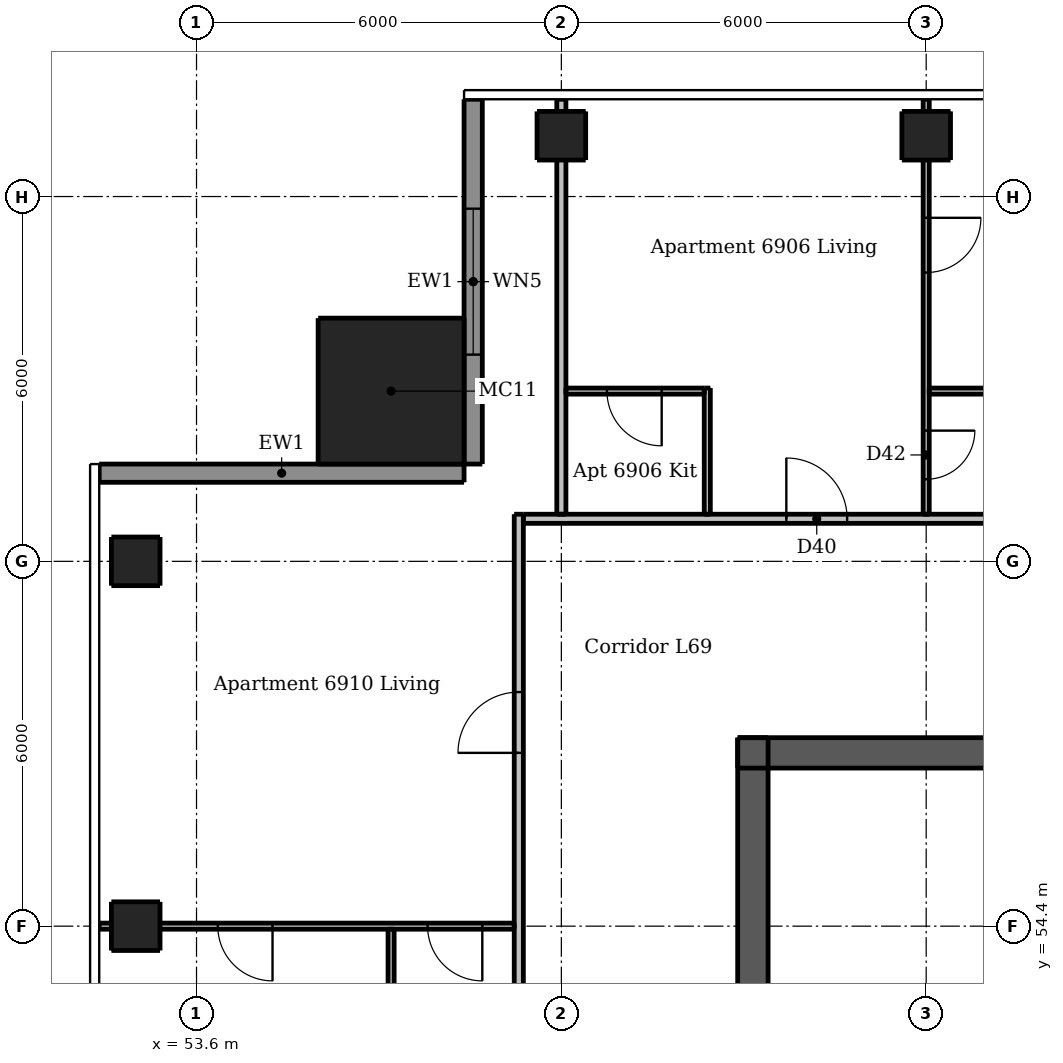
"""IFC4 building model, lengths in metres.
Left out: names, types, materials, properties, quantities, classifications, styles, units other than length and angle.
Written with IfcOpenShell. Run it as: python <this file> out.ifc"""

import sys

from ifc_helpers import new_model, si_unit, direction, frame, frame_2d, origin, origin_2d, place, context, subcontext, project, spatial, rectangle, extrude, element, fill, save


model = new_model("IFC4")
c1 = context("Model", 3, precision=1e-05, world=origin(), true_north=direction((0.0, 1.0)))
c2 = subcontext(c1, "Body", "Model", "MODEL_VIEW")
j1 = project(units=[si_unit("LENGTHUNIT", "METRE"), si_unit("PLANEANGLEUNIT", "RADIAN")], contexts=[c1])
p1 = place(None, origin())
s1 = spatial("IfcSite", under=j1, at=p1, CompositionType="ELEMENT")
p2 = place(p1, origin())
s2 = spatial("IfcBuilding", under=s1, at=p2, CompositionType="ELEMENT")
p3 = place(p2, frame((0.0, 0.0, 258.7)))
s3 = spatial("IfcBuildingStorey", under=s2, at=p3, CompositionType="ELEMENT", Elevation=258.7)
p4 = place(p3, frame((62.5, 57.25, 0.0), z_axis=(0.0, 0.0, 1.0), x_axis=(1.0, 0.0, 0.0)))
e1 = element("IfcWall", 1, at=p4, inside=s3, PredefinedType="SHEAR", context=c2, shape_type="SweptSolid", body=[
    extrude(rectangle(XDim=24.0, YDim=0.5, at=frame_2d((12.0, 0.0))), origin(), (0.0, 0.0, 1.0), 3.05),
])
p5 = place(p4, frame((21.025, 0.0, 0.0)))
e2 = element("IfcOpeningElement", 2, at=p5, cuts=e1, PredefinedType="OPENING", context=c2, shape_type="SweptSolid", body=[
    extrude(rectangle(XDim=1.1, YDim=2.1, at=frame_2d((0.55, 1.05))), frame((0.0, 0.26, 0.0), z_axis=(0.0, -1.0, 0.0), x_axis=(1.0, 0.0, 0.0)), (0.0, 0.0, 1.0), 0.52),
])
p6 = place(p4, frame((1.875, 0.0, 0.0)))
e3 = element("IfcOpeningElement", 3, at=p6, cuts=e1, PredefinedType="OPENING", context=c2, shape_type="SweptSolid", body=[
    extrude(rectangle(XDim=1.1, YDim=2.1, at=frame_2d((0.55, 1.05))), frame((0.0, 0.26, 0.0), z_axis=(0.0, -1.0, 0.0), x_axis=(1.0, 0.0, 0.0)), (0.0, 0.0, 1.0), 0.52),
])
p7 = place(p4, frame((11.55, 0.0, 0.0)))
e4 = element("IfcOpeningElement", 4, at=p7, cuts=e1, PredefinedType="OPENING", context=c2, shape_type="SweptSolid", body=[
    extrude(rectangle(XDim=0.9, YDim=2.1, at=frame_2d((0.45, 1.05))), frame((0.0, 0.26, 0.0), z_axis=(0.0, -1.0, 0.0), x_axis=(1.0, 0.0, 0.0)), (0.0, 0.0, 1.0), 0.52),
])
p8 = place(p3, frame((62.75, 33.5, 0.0), z_axis=(0.0, 0.0, 1.0), x_axis=(0.0, 1.0, 0.0)))
e5 = element("IfcWall", 5, at=p8, inside=s3, PredefinedType="SHEAR", context=c2, shape_type="SweptSolid", body=[
    extrude(rectangle(XDim=24.0, YDim=0.5, at=frame_2d((12.0, 0.0))), origin(), (0.0, 0.0, 1.0), 3.05),
])
p9 = place(p8, frame((11.2, 0.0, 0.0)))
e6 = element("IfcOpeningElement", 6, at=p9, cuts=e5, PredefinedType="OPENING", context=c2, shape_type="SweptSolid", body=[
    extrude(rectangle(XDim=1.6, YDim=2.1, at=frame_2d((0.8, 1.05))), frame((0.0, 0.26, 0.0), z_axis=(0.0, -1.0, 0.0), x_axis=(1.0, 0.0, 0.0)), (0.0, 0.0, 1.0), 0.52),
])
for number, where, z_axis, x_axis in (
    (7, (59.6, 67.4, 0.0), (0.0, 0.0, 1.0), (1.0, 0.0, 0.0)),
    (8, (65.6, 67.4, 0.0), (0.0, 0.0, 1.0), (1.0, 0.0, 0.0)),
    (9, (52.6, 54.4, 0.0), (0.0, 0.0, 1.0), (1.0, 0.0, 0.0)),
    (10, (52.6, 60.4, 0.0), (0.0, 0.0, 1.0), (1.0, 0.0, 0.0)),
):
    element("IfcColumn", number, at=place(p3, frame(where, z_axis=z_axis, x_axis=x_axis)), inside=s3, PredefinedType="COLUMN", context=c2, shape_type="SweptSolid", body=[
        extrude(rectangle(XDim=0.8, YDim=0.8, at=origin_2d()), origin(), (0.0, 0.0, 1.0), 3.05),
    ])
p10 = place(p3, frame((56.8, 63.2, 0.0), z_axis=(0.0, 0.0, 1.0), x_axis=(1.0, 0.0, 0.0)))
e11 = element("IfcColumn", 11, at=p10, inside=s3, PredefinedType="COLUMN", context=c2, shape_type="SweptSolid", body=[
    extrude(rectangle(XDim=2.4, YDim=2.4, at=origin_2d()), origin(), (0.0, 0.0, 1.0), 3.3),
])
p11 = place(p3, frame((58.15, 68.0, 0.0), z_axis=(0.0, 0.0, 1.0), x_axis=(0.0, -1.0, 0.0)))
e12 = element("IfcWall", 12, at=p11, inside=s3, PredefinedType="SOLIDWALL", context=c2, shape_type="SweptSolid", body=[
    extrude(rectangle(XDim=6.0, YDim=0.3, at=frame_2d((3.0, 0.0))), origin(), (0.0, 0.0, 1.0), 3.05),
])
p12 = place(p11, frame((1.8, 0.0, 0.15)))
e13 = element("IfcOpeningElement", 13, at=p12, cuts=e12, PredefinedType="OPENING", context=c2, shape_type="SweptSolid", body=[
    extrude(rectangle(XDim=2.4, YDim=2.1, at=frame_2d((1.2, 1.05))), frame((0.0, 0.16, 0.0), z_axis=(0.0, -1.0, 0.0), x_axis=(1.0, 0.0, 0.0)), (0.0, 0.0, 1.0), 0.32),
])
p13 = place(p3, frame((58.0, 61.85, 0.0), z_axis=(0.0, 0.0, 1.0), x_axis=(-1.0, 0.0, 0.0)))
e14 = element("IfcWall", 14, at=p13, inside=s3, PredefinedType="SOLIDWALL", context=c2, shape_type="SweptSolid", body=[
    extrude(rectangle(XDim=6.0, YDim=0.3, at=frame_2d((3.0, 0.0))), origin(), (0.0, 0.0, 1.0), 3.05),
])
p14 = place(p3, frame((56.8, 54.35, 0.0), z_axis=(0.0, 0.0, 1.0), x_axis=(0.0, -1.0, 0.0)))
e15 = element("IfcWall", 15, at=p14, inside=s3, PredefinedType="PARTITIONING", context=c2, shape_type="SweptSolid", body=[
    extrude(rectangle(XDim=5.875, YDim=0.1, at=frame_2d((2.938, 0.0))), origin(), (0.0, 0.0, 1.0), 3.05),
])
p15 = place(p14, frame((3.75, 0.0, 0.0)))
e16 = element("IfcOpeningElement", 16, at=p15, cuts=e15, PredefinedType="OPENING", context=c2, shape_type="SweptSolid", body=[
    extrude(rectangle(XDim=0.8, YDim=2.1, at=frame_2d((0.4, 1.05))), frame((0.0, 0.06, 0.0), z_axis=(0.0, -1.0, 0.0), x_axis=(1.0, 0.0, 0.0)), (0.0, 0.0, 1.0), 0.12),
])
p16 = place(p3, frame((62.0, 61.175, 0.0), z_axis=(0.0, 0.0, 1.0), x_axis=(0.0, 1.0, 0.0)))
e17 = element("IfcWall", 17, at=p16, inside=s3, PredefinedType="PARTITIONING", context=c2, shape_type="SweptSolid", body=[
    extrude(rectangle(XDim=2.075, YDim=0.1, at=frame_2d((1.038, 0.0))), origin(), (0.0, 0.0, 1.0), 3.05),
])
p17 = place(p3, frame((65.6, 68.0, 0.0), z_axis=(0.0, 0.0, 1.0), x_axis=(0.0, -1.0, 0.0)))
e18 = element("IfcWall", 18, at=p17, inside=s3, PredefinedType="PARTITIONING", context=c2, shape_type="SweptSolid", body=[
    extrude(rectangle(XDim=6.825, YDim=0.1, at=frame_2d((3.413, 0.0))), origin(), (0.0, 0.0, 1.0), 2.516),
])
p18 = place(p17, frame((1.95, 0.0, 0.0)))
e19 = element("IfcOpeningElement", 19, at=p18, cuts=e18, PredefinedType="OPENING", context=c2, shape_type="SweptSolid", body=[
    extrude(rectangle(XDim=0.9, YDim=2.1, at=frame_2d((0.45, 1.05))), frame((0.0, 0.06, 0.0), z_axis=(0.0, -1.0, 0.0), x_axis=(1.0, 0.0, 0.0)), (0.0, 0.0, 1.0), 0.12),
])
p19 = place(p17, frame((5.45, 0.0, 0.0)))
e20 = element("IfcOpeningElement", 20, at=p19, cuts=e18, PredefinedType="OPENING", context=c2, shape_type="SweptSolid", body=[
    extrude(rectangle(XDim=0.8, YDim=2.1, at=frame_2d((0.4, 1.05))), frame((0.0, 0.06, 0.0), z_axis=(0.0, -1.0, 0.0), x_axis=(1.0, 0.0, 0.0)), (0.0, 0.0, 1.0), 0.12),
])
p20 = place(p3, frame((61.95, 63.2, 0.0), z_axis=(0.0, 0.0, 1.0), x_axis=(-1.0, 0.0, 0.0)))
e21 = element("IfcWall", 21, at=p20, inside=s3, PredefinedType="PARTITIONING", context=c2, shape_type="SweptSolid", body=[
    extrude(rectangle(XDim=2.275, YDim=0.1, at=frame_2d((1.137, 0.0))), origin(), (0.0, 0.0, 1.0), 3.05),
])
p21 = place(p20, frame((0.7, 0.0, 0.0)))
e22 = element("IfcOpeningElement", 22, at=p21, cuts=e21, PredefinedType="OPENING", context=c2, shape_type="SweptSolid", body=[
    extrude(rectangle(XDim=0.9, YDim=2.1, at=frame_2d((0.45, 1.05))), frame((0.0, 0.06, 0.0), z_axis=(0.0, -1.0, 0.0), x_axis=(1.0, 0.0, 0.0)), (0.0, 0.0, 1.0), 0.12),
])
p22 = place(p3, frame((65.65, 63.2, 0.0), z_axis=(0.0, 0.0, 1.0), x_axis=(1.0, 0.0, 0.0)))
e23 = element("IfcWall", 23, at=p22, inside=s3, PredefinedType="PARTITIONING", context=c2, shape_type="SweptSolid", body=[
    extrude(rectangle(XDim=3.5, YDim=0.1, at=frame_2d((1.75, 0.0))), origin(), (0.0, 0.0, 1.0), 3.05),
])
p23 = place(p3, frame((58.825, 54.4, 0.0), z_axis=(0.0, 0.0, 1.0), x_axis=(-1.0, 0.0, 0.0)))
e24 = element("IfcWall", 24, at=p23, inside=s3, PredefinedType="PARTITIONING", context=c2, shape_type="SweptSolid", body=[
    extrude(rectangle(XDim=6.825, YDim=0.1, at=frame_2d((3.413, 0.0))), origin(), (0.0, 0.0, 1.0), 2.516),
])
p24 = place(p23, frame((0.525, 0.0, 0.0)))
e25 = element("IfcOpeningElement", 25, at=p24, cuts=e24, PredefinedType="OPENING", context=c2, shape_type="SweptSolid", body=[
    extrude(rectangle(XDim=0.9, YDim=2.1, at=frame_2d((0.45, 1.05))), frame((0.0, 0.06, 0.0), z_axis=(0.0, -1.0, 0.0), x_axis=(1.0, 0.0, 0.0)), (0.0, 0.0, 1.0), 0.12),
])
p25 = place(p23, frame((3.975, 0.0, 0.0)))
e26 = element("IfcOpeningElement", 26, at=p25, cuts=e24, PredefinedType="OPENING", context=c2, shape_type="SweptSolid", body=[
    extrude(rectangle(XDim=0.9, YDim=2.1, at=frame_2d((0.45, 1.05))), frame((0.0, 0.06, 0.0), z_axis=(0.0, -1.0, 0.0), x_axis=(1.0, 0.0, 0.0)), (0.0, 0.0, 1.0), 0.12),
])
p26 = place(p3, frame((58.9, 30.325, 0.0), z_axis=(0.0, 0.0, 1.0), x_axis=(0.0, 1.0, 0.0)))
e27 = element("IfcWall", 27, at=p26, inside=s3, PredefinedType="PARTITIONING", context=c2, shape_type="SweptSolid", body=[
    extrude(rectangle(XDim=30.85, YDim=0.15, at=frame_2d((15.425, 0.0))), origin(), (0.0, 0.0, 1.0), 3.05),
])
p27 = place(p26, frame((9.225, 0.0, 0.0)))
e28 = element("IfcOpeningElement", 28, at=p27, cuts=e27, PredefinedType="OPENING", context=c2, shape_type="SweptSolid", body=[
    extrude(rectangle(XDim=1.0, YDim=2.1, at=frame_2d((0.5, 1.05))), frame((0.0, 0.085, 0.0), z_axis=(0.0, -1.0, 0.0), x_axis=(1.0, 0.0, 0.0)), (0.0, 0.0, 1.0), 0.17),
])
p28 = place(p26, frame((26.925, 0.0, 0.0)))
e29 = element("IfcOpeningElement", 29, at=p28, cuts=e27, PredefinedType="OPENING", context=c2, shape_type="SweptSolid", body=[
    extrude(rectangle(XDim=1.0, YDim=2.1, at=frame_2d((0.5, 1.05))), frame((0.0, 0.085, 0.0), z_axis=(0.0, -1.0, 0.0), x_axis=(1.0, 0.0, 0.0)), (0.0, 0.0, 1.0), 0.17),
])
p29 = place(p3, frame((59.6, 61.175, 0.0), z_axis=(0.0, 0.0, 1.0), x_axis=(0.0, 1.0, 0.0)))
e30 = element("IfcWall", 30, at=p29, inside=s3, PredefinedType="PARTITIONING", context=c2, shape_type="SweptSolid", body=[
    extrude(rectangle(XDim=6.825, YDim=0.15, at=frame_2d((3.413, 0.0))), origin(), (0.0, 0.0, 1.0), 2.51),
])
p30 = place(p3, frame((58.975, 61.1, 0.0), z_axis=(0.0, 0.0, 1.0), x_axis=(1.0, 0.0, 0.0)))
e31 = element("IfcWall", 31, at=p30, inside=s3, PredefinedType="PARTITIONING", context=c2, shape_type="SweptSolid", body=[
    extrude(rectangle(XDim=29.25, YDim=0.15, at=frame_2d((14.625, 0.0))), origin(), (0.0, 0.0, 1.0), 3.05),
])
p31 = place(p30, frame((4.325, 0.0, 0.0)))
e32 = element("IfcOpeningElement", 32, at=p31, cuts=e31, PredefinedType="OPENING", context=c2, shape_type="SweptSolid", body=[
    extrude(rectangle(XDim=1.0, YDim=2.1, at=frame_2d((0.5, 1.05))), frame((0.0, 0.085, 0.0), z_axis=(0.0, -1.0, 0.0), x_axis=(1.0, 0.0, 0.0)), (0.0, 0.0, 1.0), 0.17),
])
p32 = place(p30, frame((15.125, 0.0, 0.0)))
e33 = element("IfcOpeningElement", 33, at=p32, cuts=e31, PredefinedType="OPENING", context=c2, shape_type="SweptSolid", body=[
    extrude(rectangle(XDim=1.0, YDim=2.1, at=frame_2d((0.5, 1.05))), frame((0.0, 0.085, 0.0), z_axis=(0.0, -1.0, 0.0), x_axis=(1.0, 0.0, 0.0)), (0.0, 0.0, 1.0), 0.17),
])
p33 = place(p30, frame((26.475, 0.0, 0.0)))
e34 = element("IfcOpeningElement", 34, at=p33, cuts=e31, PredefinedType="OPENING", context=c2, shape_type="SweptSolid", body=[
    extrude(rectangle(XDim=1.0, YDim=2.1, at=frame_2d((0.5, 1.05))), frame((0.0, 0.085, 0.0), z_axis=(0.0, -1.0, 0.0), x_axis=(1.0, 0.0, 0.0)), (0.0, 0.0, 1.0), 0.17),
])
p34 = place(p12, origin())
e35 = element("IfcWindow", 35, at=p34, inside=s3, PartitioningType="DOUBLE_PANEL_VERTICAL", PredefinedType="WINDOW", context=c2, shape_type="SweptSolid", body=[
    extrude(rectangle(XDim=2.4, YDim=2.1, at=frame_2d((1.2, 1.05))), frame((0.0, 0.03, 0.0), z_axis=(0.0, -1.0, 0.0), x_axis=(1.0, 0.0, 0.0)), (0.0, 0.0, 1.0), 0.06),
])
fill(e13, e35)
p35 = place(p6, origin())
e36 = element("IfcDoor", 36, at=p35, inside=s3, OperationType="SINGLE_SWING_LEFT", PredefinedType="DOOR", context=c2, shape_type="SweptSolid", body=[
    extrude(rectangle(XDim=1.1, YDim=2.1, at=frame_2d((0.55, 1.05))), frame((0.0, -0.188, 0.0), z_axis=(0.0, -1.0, 0.0), x_axis=(1.0, 0.0, 0.0)), (0.0, 0.0, 1.0), 0.05),
])
fill(e3, e36)
p36 = place(p31, origin())
e37 = element("IfcDoor", 37, at=p36, inside=s3, OperationType="SINGLE_SWING_LEFT", PredefinedType="DOOR", context=c2, shape_type="SweptSolid", body=[
    extrude(rectangle(XDim=1.0, YDim=2.1, at=frame_2d((0.5, 1.05))), frame((0.0, 0.025, 0.0), z_axis=(0.0, -1.0, 0.0), x_axis=(1.0, 0.0, 0.0)), (0.0, 0.0, 1.0), 0.05),
])
fill(e32, e37)
p37 = place(p21, origin())
e38 = element("IfcDoor", 38, at=p37, inside=s3, OperationType="SINGLE_SWING_LEFT", PredefinedType="DOOR", context=c2, shape_type="SweptSolid", body=[
    extrude(rectangle(XDim=0.9, YDim=2.1, at=frame_2d((0.45, 1.05))), frame((0.0, 0.025, 0.0), z_axis=(0.0, -1.0, 0.0), x_axis=(1.0, 0.0, 0.0)), (0.0, 0.0, 1.0), 0.05),
])
fill(e22, e38)
p38 = place(p18, origin())
e39 = element("IfcDoor", 39, at=p38, inside=s3, OperationType="SINGLE_SWING_LEFT", PredefinedType="DOOR", context=c2, shape_type="SweptSolid", body=[
    extrude(rectangle(XDim=0.9, YDim=2.1, at=frame_2d((0.45, 1.05))), frame((0.0, 0.025, 0.0), z_axis=(0.0, -1.0, 0.0), x_axis=(1.0, 0.0, 0.0)), (0.0, 0.0, 1.0), 0.05),
])
fill(e19, e39)
p39 = place(p19, origin())
e40 = element("IfcDoor", 40, at=p39, inside=s3, OperationType="SINGLE_SWING_LEFT", PredefinedType="DOOR", context=c2, shape_type="SweptSolid", body=[
    extrude(rectangle(XDim=0.8, YDim=2.1, at=frame_2d((0.4, 1.05))), frame((0.0, 0.025, 0.0), z_axis=(0.0, -1.0, 0.0), x_axis=(1.0, 0.0, 0.0)), (0.0, 0.0, 1.0), 0.05),
])
fill(e20, e40)
p40 = place(p28, origin())
e41 = element("IfcDoor", 41, at=p40, inside=s3, OperationType="SINGLE_SWING_LEFT", PredefinedType="DOOR", context=c2, shape_type="SweptSolid", body=[
    extrude(rectangle(XDim=1.0, YDim=2.1, at=frame_2d((0.5, 1.05))), frame((0.0, 0.025, 0.0), z_axis=(0.0, -1.0, 0.0), x_axis=(1.0, 0.0, 0.0)), (0.0, 0.0, 1.0), 0.05),
])
fill(e29, e41)
p41 = place(p24, origin())
e42 = element("IfcDoor", 42, at=p41, inside=s3, OperationType="SINGLE_SWING_LEFT", PredefinedType="DOOR", context=c2, shape_type="SweptSolid", body=[
    extrude(rectangle(XDim=0.9, YDim=2.1, at=frame_2d((0.45, 1.05))), frame((0.0, 0.025, 0.0), z_axis=(0.0, -1.0, 0.0), x_axis=(1.0, 0.0, 0.0)), (0.0, 0.0, 1.0), 0.05),
])
fill(e25, e42)
p42 = place(p25, origin())
e43 = element("IfcDoor", 43, at=p42, inside=s3, OperationType="SINGLE_SWING_LEFT", PredefinedType="DOOR", context=c2, shape_type="SweptSolid", body=[
    extrude(rectangle(XDim=0.9, YDim=2.1, at=frame_2d((0.45, 1.05))), frame((0.0, 0.025, 0.0), z_axis=(0.0, -1.0, 0.0), x_axis=(1.0, 0.0, 0.0)), (0.0, 0.0, 1.0), 0.05),
])
fill(e26, e43)
save(model, sys.argv[1])
